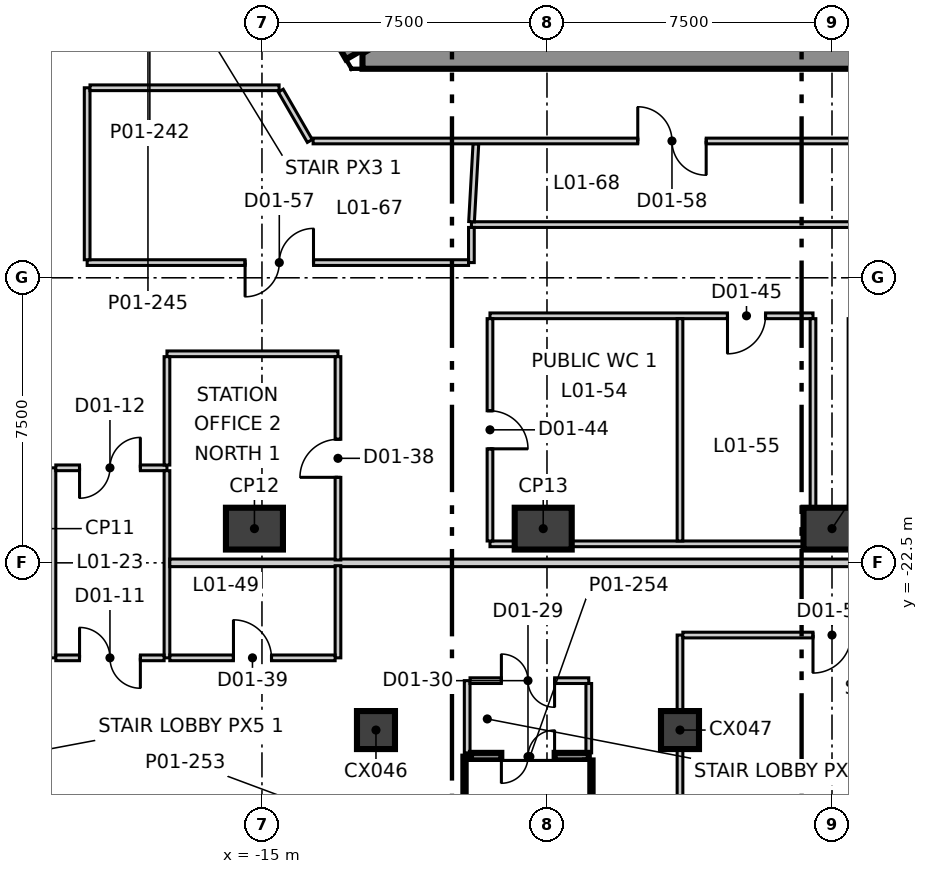
"""IFC4 building model, lengths in metres.
Left out: names, types, materials, properties, quantities, classifications, styles, units other than length and angle.
Written with IfcOpenShell. Run it as: python <this file> out.ifc"""

import sys

from ifc_helpers import new_model, si_unit, direction, frame, frame_2d, origin, origin_2d, place, context, subcontext, project, spatial, polyline, rectangle, outline, extrude, element, fill, save


model = new_model("IFC4")
c1 = context("Model", 3, precision=1e-05, world=origin(), true_north=direction((0.0, 1.0)))
c2 = subcontext(c1, "Body", "Model", "MODEL_VIEW")
j1 = project(units=[si_unit("LENGTHUNIT", "METRE"), si_unit("PLANEANGLEUNIT", "RADIAN")], contexts=[c1])
p1 = place(None, origin())
s1 = spatial("IfcSite", under=j1, at=p1, CompositionType="ELEMENT")
p2 = place(p1, origin())
s2 = spatial("IfcBuilding", under=s1, at=p2, CompositionType="ELEMENT")
p3 = place(p2, frame((0.0, 0.0, 8.5)))
s3 = spatial("IfcBuildingStorey", under=s2, at=p3, CompositionType="ELEMENT", Elevation=8.5)
p4 = place(p3, frame((-13.972, -6.2, -0.4), z_axis=(0.0, 0.0, 1.0), x_axis=(0.500077567175, -0.865980615723, 0.0)))
e1 = element("IfcWall", 1, at=p4, inside=s3, PredefinedType="SHEAR", context=c2, shape_type="SweptSolid", body=[
    extrude(outline(polyline([(-0.289, -0.5), (1.616, -0.5), (3.522, -0.5), (2.944, 0.499), (1.617, 0.5), (0.289, 0.5), (-0.289, -0.5)])), origin(), (0.0, 0.0, 1.0), 6.0),
])
p5 = place(p4, frame((0.917, 0.0, 0.4)))
e2 = element("IfcOpeningElement", 2, at=p5, cuts=e1, PredefinedType="OPENING", context=c2, shape_type="SweptSolid", body=[
    extrude(rectangle(XDim=1.4, YDim=2.1, at=frame_2d((0.7, 1.05))), frame((0.0, 0.51, 0.0), z_axis=(0.0, -1.0, 0.0), x_axis=(1.0, 0.0, 0.0)), (0.0, 0.0, 1.0), 1.02),
])
p6 = place(p3, frame((-12.355, -9.0, -0.4), z_axis=(0.0, 0.0, 1.0), x_axis=(1.0, 0.0, 0.0)))
e3 = element("IfcWall", 3, at=p6, inside=s3, PredefinedType="SHEAR", context=c2, shape_type="SweptSolid", body=[
    extrude(outline(polyline([(-0.289, -0.5), (1.656, -0.5), (3.601, -0.5), (5.547, -0.5), (7.492, -0.5), (9.437, -0.5), (11.382, -0.5), (13.328, -0.5), (15.273, -0.5), (17.218, -0.5), (19.163, -0.5), (21.109, -0.5), (23.054, -0.5), (24.999, -0.5), (24.422, 0.5), (22.566, 0.5), (20.709, 0.5), (18.853, 0.5), (16.996, 0.5), (15.14, 0.5), (13.283, 0.5), (11.427, 0.5), (9.57, 0.5), (7.714, 0.5), (5.857, 0.5), (4.001, 0.5), (2.145, 0.5), (0.288, 0.5), (-0.289, -0.5)])), origin(), (0.0, 0.0, 1.0), 6.0),
])
for number, where, z_axis, x_axis in (
    (4, (-15.198, -21.6, -0.4), (0.0, 0.0, 1.0), (1.0, 0.0, 0.0)),
    (5, (-7.599, -21.6, -0.4), (0.0, 0.0, 1.0), (1.0, 0.0, 0.0)),
    (6, (0.0, -21.6, -0.4), (0.0, 0.0, 1.0), (1.0, 0.0, 0.0)),
):
    element("IfcColumn", number, at=place(p3, frame(where, z_axis=z_axis, x_axis=x_axis)), inside=s3, PredefinedType="COLUMN", context=c2, shape_type="SweptSolid", body=[
        extrude(rectangle(XDim=1.5, YDim=1.1, at=origin_2d()), origin(), (0.0, 0.0, 1.0), 6.0),
    ])
for number, where, z_axis, x_axis in (
    (7, (-12.0, -26.9, -0.4), (0.0, 0.0, 1.0), (1.0, 0.0, 0.0)),
    (8, (-4.0, -26.9, -0.4), (0.0, 0.0, 1.0), (1.0, 0.0, 0.0)),
):
    element("IfcColumn", number, at=place(p3, frame(where, z_axis=z_axis, x_axis=x_axis)), inside=s3, PredefinedType="COLUMN", context=c2, shape_type="SweptSolid", body=[
        extrude(rectangle(XDim=1.0, YDim=1.0, at=origin_2d()), origin(), (0.0, 0.0, 1.0), 6.0),
    ])
p7 = place(p3, frame((-9.6, -27.5, 0.0), z_axis=(0.0, 0.0, 1.0), x_axis=(0.0, 1.0, 0.0)))
e9 = element("IfcWall", 9, at=p7, inside=s3, PredefinedType="PARTITIONING", context=c2, shape_type="SweptSolid", body=[
    extrude(rectangle(XDim=1.9, YDim=0.15, at=frame_2d((0.95, 0.0))), origin(), (0.0, 0.0, 1.0), 5.6),
])
p8 = place(p3, frame((-9.525, -25.6, 0.0), z_axis=(0.0, 0.0, 1.0), x_axis=(1.0, 0.0, 0.0)))
e10 = element("IfcWall", 10, at=p8, inside=s3, PredefinedType="PARTITIONING", context=c2, shape_type="SweptSolid", body=[
    extrude(rectangle(XDim=3.125, YDim=0.15, at=frame_2d((1.562, 0.0))), origin(), (0.0, 0.0, 1.0), 5.6),
])
p9 = place(p8, frame((0.825, 0.0, 0.0)))
e11 = element("IfcOpeningElement", 11, at=p9, cuts=e10, PredefinedType="OPENING", context=c2, shape_type="SweptSolid", body=[
    extrude(rectangle(XDim=1.4, YDim=2.1, at=frame_2d((0.7, 1.05))), frame((0.0, 0.085, 0.0), z_axis=(0.0, -1.0, 0.0), x_axis=(1.0, 0.0, 0.0)), (0.0, 0.0, 1.0), 0.17),
])
p10 = place(p3, frame((-6.4, -27.5, 0.0), z_axis=(0.0, 0.0, 1.0), x_axis=(0.0, 1.0, 0.0)))
e12 = element("IfcWall", 12, at=p10, inside=s3, PredefinedType="PARTITIONING", context=c2, shape_type="SweptSolid", body=[
    extrude(rectangle(XDim=1.825, YDim=0.15, at=frame_2d((0.913, 0.0))), origin(), (0.0, 0.0, 1.0), 5.6),
])
p11 = place(p3, frame((-20.5, -25.0, 0.0), z_axis=(0.0, 0.0, 1.0), x_axis=(0.0, 1.0, 0.0)))
e13 = element("IfcWall", 13, at=p11, inside=s3, PredefinedType="PARTITIONING", context=c2, shape_type="SweptSolid", body=[
    extrude(rectangle(XDim=5.0, YDim=0.15, at=frame_2d((2.5, 0.0))), origin(), (0.0, 0.0, 1.0), 5.6),
])
p12 = place(p3, frame((-20.425, -20.0, 0.0), z_axis=(0.0, 0.0, 1.0), x_axis=(1.0, 0.0, 0.0)))
e14 = element("IfcWall", 14, at=p12, inside=s3, PredefinedType="PARTITIONING", context=c2, shape_type="SweptSolid", body=[
    extrude(rectangle(XDim=2.925, YDim=0.15, at=frame_2d((1.462, 0.0))), origin(), (0.0, 0.0, 1.0), 5.6),
])
p13 = place(p12, frame((0.625, 0.0, 0.0)))
e15 = element("IfcOpeningElement", 15, at=p13, cuts=e14, PredefinedType="OPENING", context=c2, shape_type="SweptSolid", body=[
    extrude(rectangle(XDim=1.6, YDim=2.1, at=frame_2d((0.8, 1.05))), frame((0.0, 0.085, 0.0), z_axis=(0.0, -1.0, 0.0), x_axis=(1.0, 0.0, 0.0)), (0.0, 0.0, 1.0), 0.17),
])
p14 = place(p3, frame((-17.5, -25.0, 0.0), z_axis=(0.0, 0.0, 1.0), x_axis=(0.0, 1.0, 0.0)))
e16 = element("IfcWall", 16, at=p14, inside=s3, PredefinedType="PARTITIONING", context=c2, shape_type="SweptSolid", body=[
    extrude(rectangle(XDim=4.925, YDim=0.15, at=frame_2d((2.462, 0.0))), origin(), (0.0, 0.0, 1.0), 5.6),
])
p15 = place(p3, frame((-20.425, -25.0, 0.0), z_axis=(0.0, 0.0, 1.0), x_axis=(1.0, 0.0, 0.0)))
e17 = element("IfcWall", 17, at=p15, inside=s3, PredefinedType="PARTITIONING", context=c2, shape_type="SweptSolid", body=[
    extrude(rectangle(XDim=2.85, YDim=0.15, at=frame_2d((1.425, 0.0))), origin(), (0.0, 0.0, 1.0), 5.6),
])
p16 = place(p15, frame((0.625, 0.0, 0.0)))
e18 = element("IfcOpeningElement", 18, at=p16, cuts=e17, PredefinedType="OPENING", context=c2, shape_type="SweptSolid", body=[
    extrude(rectangle(XDim=1.6, YDim=2.1, at=frame_2d((0.8, 1.05))), frame((0.0, 0.085, 0.0), z_axis=(0.0, -1.0, 0.0), x_axis=(1.0, 0.0, 0.0)), (0.0, 0.0, 1.0), 0.17),
])
p17 = place(p3, frame((-17.425, -22.5, 0.0), z_axis=(0.0, 0.0, 1.0), x_axis=(1.0, 0.0, 0.0)))
e19 = element("IfcWall", 19, at=p17, inside=s3, PredefinedType="SOLIDWALL", context=c2, shape_type="SweptSolid", body=[
    extrude(rectangle(XDim=34.85, YDim=0.2, at=frame_2d((17.425, 0.0))), origin(), (0.0, 0.0, 1.0), 5.6),
])
p18 = place(p3, frame((-17.5, -17.0, 0.0), z_axis=(0.0, 0.0, 1.0), x_axis=(1.0, 0.0, 0.0)))
e20 = element("IfcWall", 20, at=p18, inside=s3, PredefinedType="PARTITIONING", context=c2, shape_type="SweptSolid", body=[
    extrude(rectangle(XDim=4.5, YDim=0.15, at=frame_2d((2.25, 0.0))), origin(), (0.0, 0.0, 1.0), 5.6),
])
p19 = place(p3, frame((-13.0, -25.0, 0.0), z_axis=(0.0, 0.0, 1.0), x_axis=(0.0, 1.0, 0.0)))
e21 = element("IfcWall", 21, at=p19, inside=s3, PredefinedType="PARTITIONING", context=c2, shape_type="SweptSolid", body=[
    extrude(rectangle(XDim=2.425, YDim=0.15, at=frame_2d((1.212, 0.0))), origin(), (0.0, 0.0, 1.0), 5.6),
])
p20 = place(p3, frame((-13.0, -22.425, 0.0), z_axis=(0.0, 0.0, 1.0), x_axis=(0.0, 1.0, 0.0)))
e22 = element("IfcWall", 22, at=p20, inside=s3, PredefinedType="PARTITIONING", context=c2, shape_type="SweptSolid", body=[
    extrude(rectangle(XDim=5.35, YDim=0.15, at=frame_2d((2.675, 0.0))), origin(), (0.0, 0.0, 1.0), 5.6),
])
p21 = place(p20, frame((2.175, 0.0, 0.0)))
e23 = element("IfcOpeningElement", 23, at=p21, cuts=e22, PredefinedType="OPENING", context=c2, shape_type="SweptSolid", body=[
    extrude(rectangle(XDim=1.0, YDim=2.1, at=frame_2d((0.5, 1.05))), frame((0.0, 0.085, 0.0), z_axis=(0.0, -1.0, 0.0), x_axis=(1.0, 0.0, 0.0)), (0.0, 0.0, 1.0), 0.17),
])
p22 = place(p3, frame((-17.425, -25.0, 0.0), z_axis=(0.0, 0.0, 1.0), x_axis=(1.0, 0.0, 0.0)))
e24 = element("IfcWall", 24, at=p22, inside=s3, PredefinedType="PARTITIONING", context=c2, shape_type="SweptSolid", body=[
    extrude(rectangle(XDim=4.35, YDim=0.15, at=frame_2d((2.175, 0.0))), origin(), (0.0, 0.0, 1.0), 5.6),
])
p23 = place(p22, frame((1.675, 0.0, 0.0)))
e25 = element("IfcOpeningElement", 25, at=p23, cuts=e24, PredefinedType="OPENING", context=c2, shape_type="SweptSolid", body=[
    extrude(rectangle(XDim=1.0, YDim=2.1, at=frame_2d((0.5, 1.05))), frame((0.0, 0.085, 0.0), z_axis=(0.0, -1.0, 0.0), x_axis=(1.0, 0.0, 0.0)), (0.0, 0.0, 1.0), 0.17),
])
p24 = place(p3, frame((-17.5, -19.927, 0.0), z_axis=(0.0, 0.0, 1.0), x_axis=(0.0, 1.0, 0.0)))
e26 = element("IfcWall", 26, at=p24, inside=s3, PredefinedType="PARTITIONING", context=c2, shape_type="SweptSolid", body=[
    extrude(rectangle(XDim=2.852, YDim=0.15, at=frame_2d((1.426, 0.0))), origin(), (0.0, 0.0, 1.0), 5.6),
])
p25 = place(p3, frame((-9.489, -13.6, 0.0), z_axis=(0.0, 0.0, 1.0), x_axis=(1.0, 0.0, 0.0)))
e27 = element("IfcWall", 27, at=p25, inside=s3, PredefinedType="PARTITIONING", context=c2, shape_type="SweptSolid", body=[
    extrude(rectangle(XDim=17.389, YDim=0.15, at=frame_2d((8.694, 0.0))), origin(), (0.0, 0.0, 1.0), 5.6),
])
p26 = place(p3, frame((-9.485, -13.525, 0.0), z_axis=(0.0, 0.0, 1.0), x_axis=(0.055535883175, 0.99845669194, 0.0)))
e28 = element("IfcWall", 28, at=p26, inside=s3, PredefinedType="PARTITIONING", context=c2, shape_type="SweptSolid", body=[
    extrude(rectangle(XDim=2.053, YDim=0.15, at=frame_2d((1.026, 0.0))), origin(), (0.0, 0.0, 1.0), 5.6),
])
p27 = place(p3, frame((-9.489, -14.6, 0.0), z_axis=(0.0, 0.0, 1.0), x_axis=(0.0, 1.0, 0.0)))
e29 = element("IfcWall", 29, at=p27, inside=s3, PredefinedType="PARTITIONING", context=c2, shape_type="SweptSolid", body=[
    extrude(rectangle(XDim=0.925, YDim=0.15, at=frame_2d((0.462, 0.0))), origin(), (0.0, 0.0, 1.0), 5.6),
])
p28 = place(p3, frame((-19.6, -14.6, 0.0), z_axis=(0.0, 0.0, 1.0), x_axis=(1.0, 0.0, 0.0)))
e30 = element("IfcWall", 30, at=p28, inside=s3, PredefinedType="PARTITIONING", context=c2, shape_type="SweptSolid", body=[
    extrude(rectangle(XDim=10.036, YDim=0.15, at=frame_2d((5.018, 0.0))), origin(), (0.0, 0.0, 1.0), 5.6),
])
p29 = place(p28, frame((4.156, 0.0, 0.0)))
e31 = element("IfcOpeningElement", 31, at=p29, cuts=e30, PredefinedType="OPENING", context=c2, shape_type="SweptSolid", body=[
    extrude(rectangle(XDim=1.8, YDim=2.1, at=frame_2d((0.9, 1.05))), frame((0.0, 0.085, 0.0), z_axis=(0.0, -1.0, 0.0), x_axis=(1.0, 0.0, 0.0)), (0.0, 0.0, 1.0), 0.17),
])
p30 = place(p3, frame((-19.6, -14.525, 0.0), z_axis=(0.0, 0.0, 1.0), x_axis=(0.0, 1.0, 0.0)))
e32 = element("IfcWall", 32, at=p30, inside=s3, PredefinedType="PARTITIONING", context=c2, shape_type="SweptSolid", body=[
    extrude(rectangle(XDim=4.525, YDim=0.15, at=frame_2d((2.262, 0.0))), origin(), (0.0, 0.0, 1.0), 5.6),
])
p31 = place(p3, frame((-19.525, -10.0, 0.0), z_axis=(0.0, 0.0, 1.0), x_axis=(1.0, 0.0, 0.0)))
e33 = element("IfcWall", 33, at=p31, inside=s3, PredefinedType="PARTITIONING", context=c2, shape_type="SweptSolid", body=[
    extrude(rectangle(XDim=4.976, YDim=0.15, at=frame_2d((2.488, 0.0))), origin(), (0.0, 0.0, 1.0), 5.6),
])
p32 = place(p3, frame((-14.506, -10.075, 0.0), z_axis=(0.0, 0.0, 1.0), x_axis=(0.500086174919, -0.865975644955, 0.0)))
e34 = element("IfcWall", 34, at=p32, inside=s3, PredefinedType="PARTITIONING", context=c2, shape_type="SweptSolid", body=[
    extrude(rectangle(XDim=1.53, YDim=0.15, at=frame_2d((0.765, 0.0))), origin(), (0.0, 0.0, 1.0), 5.6),
])
p33 = place(p3, frame((-13.654, -11.4, 0.0), z_axis=(0.0, 0.0, 1.0), x_axis=(1.0, 0.0, 0.0)))
e35 = element("IfcWall", 35, at=p33, inside=s3, PredefinedType="PARTITIONING", context=c2, shape_type="SweptSolid", body=[
    extrude(rectangle(XDim=24.254, YDim=0.15, at=frame_2d((12.127, 0.0))), origin(), (0.0, 0.0, 1.0), 5.6),
])
p34 = place(p33, frame((8.543, 0.0, 0.0)))
e36 = element("IfcOpeningElement", 36, at=p34, cuts=e35, PredefinedType="OPENING", context=c2, shape_type="SweptSolid", body=[
    extrude(rectangle(XDim=1.8, YDim=2.1, at=frame_2d((0.9, 1.05))), frame((0.0, 0.085, 0.0), z_axis=(0.0, -1.0, 0.0), x_axis=(1.0, 0.0, 0.0)), (0.0, 0.0, 1.0), 0.17),
])
p35 = place(p3, frame((-9.0, -16.0, 0.0), z_axis=(0.0, 0.0, 1.0), x_axis=(1.0, 0.0, 0.0)))
e37 = element("IfcWall", 37, at=p35, inside=s3, PredefinedType="PARTITIONING", context=c2, shape_type="SweptSolid", body=[
    extrude(rectangle(XDim=8.5, YDim=0.15, at=frame_2d((4.25, 0.0))), origin(), (0.0, 0.0, 1.0), 5.6),
])
p36 = place(p35, frame((6.25, 0.0, 0.0)))
e38 = element("IfcOpeningElement", 38, at=p36, cuts=e37, PredefinedType="OPENING", context=c2, shape_type="SweptSolid", body=[
    extrude(rectangle(XDim=1.0, YDim=2.1, at=frame_2d((0.5, 1.05))), frame((0.0, 0.085, 0.0), z_axis=(0.0, -1.0, 0.0), x_axis=(1.0, 0.0, 0.0)), (0.0, 0.0, 1.0), 0.17),
])
p37 = place(p3, frame((-0.5, -22.0, 0.0), z_axis=(0.0, 0.0, 1.0), x_axis=(0.0, 1.0, 0.0)))
e39 = element("IfcWall", 39, at=p37, inside=s3, PredefinedType="PARTITIONING", context=c2, shape_type="SweptSolid", body=[
    extrude(rectangle(XDim=5.925, YDim=0.15, at=frame_2d((2.962, 0.0))), origin(), (0.0, 0.0, 1.0), 5.1),
])
p38 = place(p3, frame((-9.0, -22.0, 0.0), z_axis=(0.0, 0.0, 1.0), x_axis=(1.0, 0.0, 0.0)))
e40 = element("IfcWall", 40, at=p38, inside=s3, PredefinedType="PARTITIONING", context=c2, shape_type="SweptSolid", body=[
    extrude(rectangle(XDim=8.425, YDim=0.15, at=frame_2d((4.212, 0.0))), origin(), (0.0, 0.0, 1.0), 5.6),
])
p39 = place(p3, frame((-4.0, -32.0, 0.0), z_axis=(0.0, 0.0, 1.0), x_axis=(0.0, 1.0, 0.0)))
e41 = element("IfcWall", 41, at=p39, inside=s3, PredefinedType="PARTITIONING", context=c2, shape_type="SweptSolid", body=[
    extrude(rectangle(XDim=7.6, YDim=0.15, at=frame_2d((3.8, 0.0))), origin(), (0.0, 0.0, 1.0), 5.6),
])
p40 = place(p3, frame((-4.0, -21.925, 0.0), z_axis=(0.0, 0.0, 1.0), x_axis=(0.0, 1.0, 0.0)))
e42 = element("IfcWall", 42, at=p40, inside=s3, PredefinedType="PARTITIONING", context=c2, shape_type="SweptSolid", body=[
    extrude(rectangle(XDim=5.85, YDim=0.15, at=frame_2d((2.925, 0.0))), origin(), (0.0, 0.0, 1.0), 5.6),
])
p41 = place(p3, frame((-9.0, -21.925, 0.0), z_axis=(0.0, 0.0, 1.0), x_axis=(0.0, 1.0, 0.0)))
e43 = element("IfcWall", 43, at=p41, inside=s3, PredefinedType="PARTITIONING", context=c2, shape_type="SweptSolid", body=[
    extrude(rectangle(XDim=5.85, YDim=0.15, at=frame_2d((2.925, 0.0))), origin(), (0.0, 0.0, 1.0), 5.6),
])
p42 = place(p41, frame((2.425, 0.0, 0.0)))
e44 = element("IfcOpeningElement", 44, at=p42, cuts=e43, PredefinedType="OPENING", context=c2, shape_type="SweptSolid", body=[
    extrude(rectangle(XDim=1.0, YDim=2.1, at=frame_2d((0.5, 1.05))), frame((0.0, 0.085, 0.0), z_axis=(0.0, -1.0, 0.0), x_axis=(1.0, 0.0, 0.0)), (0.0, 0.0, 1.0), 0.17),
])
p43 = place(p3, frame((-3.925, -24.4, 0.0), z_axis=(0.0, 0.0, 1.0), x_axis=(1.0, 0.0, 0.0)))
e45 = element("IfcWall", 45, at=p43, inside=s3, PredefinedType="PARTITIONING", context=c2, shape_type="SweptSolid", body=[
    extrude(rectangle(XDim=7.925, YDim=0.15, at=frame_2d((3.962, 0.0))), origin(), (0.0, 0.0, 1.0), 5.6),
])
p44 = place(p43, frame((3.425, 0.0, 0.0)))
e46 = element("IfcOpeningElement", 46, at=p44, cuts=e45, PredefinedType="OPENING", context=c2, shape_type="SweptSolid", body=[
    extrude(rectangle(XDim=1.0, YDim=2.1, at=frame_2d((0.5, 1.05))), frame((0.0, 0.085, 0.0), z_axis=(0.0, -1.0, 0.0), x_axis=(1.0, 0.0, 0.0)), (0.0, 0.0, 1.0), 0.17),
])
p45 = place(p3, frame((-9.6, -33.4, 0.0), z_axis=(0.0, 0.0, 1.0), x_axis=(0.0, 1.0, 0.0)))
e47 = element("IfcWall", 47, at=p45, inside=s3, PredefinedType="SOLIDWALL", context=c2, shape_type="SweptSolid", body=[
    extrude(rectangle(XDim=5.8, YDim=0.2, at=frame_2d((2.9, 0.0))), origin(), (0.0, 0.0, 1.0), 5.6),
])
p46 = place(p3, frame((-9.5, -27.6, 0.0), z_axis=(0.0, 0.0, 1.0), x_axis=(1.0, 0.0, 0.0)))
e48 = element("IfcWall", 48, at=p46, inside=s3, PredefinedType="SOLIDWALL", context=c2, shape_type="SweptSolid", body=[
    extrude(rectangle(XDim=3.1, YDim=0.2, at=frame_2d((1.55, 0.0))), origin(), (0.0, 0.0, 1.0), 5.6),
])
p47 = place(p46, frame((0.8, 0.0, 0.0)))
e49 = element("IfcOpeningElement", 49, at=p47, cuts=e48, PredefinedType="OPENING", context=c2, shape_type="SweptSolid", body=[
    extrude(rectangle(XDim=1.4, YDim=2.1, at=frame_2d((0.7, 1.05))), frame((0.0, 0.11, 0.0), z_axis=(0.0, -1.0, 0.0), x_axis=(1.0, 0.0, 0.0)), (0.0, 0.0, 1.0), 0.22),
])
p48 = place(p3, frame((-6.4, -33.4, 0.0), z_axis=(0.0, 0.0, 1.0), x_axis=(0.0, 1.0, 0.0)))
e50 = element("IfcWall", 50, at=p48, inside=s3, PredefinedType="SOLIDWALL", context=c2, shape_type="SweptSolid", body=[
    extrude(rectangle(XDim=5.7, YDim=0.2, at=frame_2d((2.85, 0.0))), origin(), (0.0, 0.0, 1.0), 5.6),
])
p49 = place(p16, origin())
e51 = element("IfcDoor", 51, at=p49, inside=s3, OperationType="DOUBLE_DOOR_SINGLE_SWING", PredefinedType="DOOR", context=c2, shape_type="SweptSolid", body=[
    extrude(rectangle(XDim=1.6, YDim=2.1, at=frame_2d((0.8, 1.05))), frame((0.0, 0.025, 0.0), z_axis=(0.0, -1.0, 0.0), x_axis=(1.0, 0.0, 0.0)), (0.0, 0.0, 1.0), 0.05),
])
fill(e18, e51)
p50 = place(p13, origin())
e52 = element("IfcDoor", 52, at=p50, inside=s3, OperationType="DOUBLE_DOOR_SINGLE_SWING", PredefinedType="DOOR", context=c2, shape_type="SweptSolid", body=[
    extrude(rectangle(XDim=1.6, YDim=2.1, at=frame_2d((0.8, 1.05))), frame((0.0, 0.025, 0.0), z_axis=(0.0, -1.0, 0.0), x_axis=(1.0, 0.0, 0.0)), (0.0, 0.0, 1.0), 0.05),
])
fill(e15, e52)
p51 = place(p47, origin())
e53 = element("IfcDoor", 53, at=p51, inside=s3, OperationType="DOUBLE_DOOR_SINGLE_SWING", PredefinedType="DOOR", context=c2, shape_type="SweptSolid", body=[
    extrude(rectangle(XDim=1.4, YDim=2.1, at=frame_2d((0.7, 1.05))), frame((0.0, 0.025, 0.0), z_axis=(0.0, -1.0, 0.0), x_axis=(1.0, 0.0, 0.0)), (0.0, 0.0, 1.0), 0.05),
])
fill(e49, e53)
p52 = place(p9, origin())
e54 = element("IfcDoor", 54, at=p52, inside=s3, OperationType="DOUBLE_DOOR_SINGLE_SWING", PredefinedType="DOOR", context=c2, shape_type="SweptSolid", body=[
    extrude(rectangle(XDim=1.4, YDim=2.1, at=frame_2d((0.7, 1.05))), frame((0.0, 0.025, 0.0), z_axis=(0.0, -1.0, 0.0), x_axis=(1.0, 0.0, 0.0)), (0.0, 0.0, 1.0), 0.05),
])
fill(e11, e54)
p53 = place(p21, origin())
e55 = element("IfcDoor", 55, at=p53, inside=s3, OperationType="SINGLE_SWING_RIGHT", PredefinedType="DOOR", context=c2, shape_type="SweptSolid", body=[
    extrude(rectangle(XDim=1.0, YDim=2.1, at=frame_2d((0.5, 1.05))), frame((0.0, 0.025, 0.0), z_axis=(0.0, -1.0, 0.0), x_axis=(1.0, 0.0, 0.0)), (0.0, 0.0, 1.0), 0.05),
])
fill(e23, e55)
p54 = place(p23, origin())
e56 = element("IfcDoor", 56, at=p54, inside=s3, OperationType="SINGLE_SWING_RIGHT", PredefinedType="DOOR", context=c2, shape_type="SweptSolid", body=[
    extrude(rectangle(XDim=1.0, YDim=2.1, at=frame_2d((0.5, 1.05))), frame((0.0, 0.025, 0.0), z_axis=(0.0, -1.0, 0.0), x_axis=(1.0, 0.0, 0.0)), (0.0, 0.0, 1.0), 0.05),
])
fill(e25, e56)
p55 = place(p42, origin())
e57 = element("IfcDoor", 57, at=p55, inside=s3, OperationType="SINGLE_SWING_LEFT", PredefinedType="DOOR", context=c2, shape_type="SweptSolid", body=[
    extrude(rectangle(XDim=1.0, YDim=2.1, at=frame_2d((0.5, 1.05))), frame((0.0, 0.025, 0.0), z_axis=(0.0, -1.0, 0.0), x_axis=(1.0, 0.0, 0.0)), (0.0, 0.0, 1.0), 0.05),
])
fill(e44, e57)
p56 = place(p36, origin())
e58 = element("IfcDoor", 58, at=p56, inside=s3, OperationType="SINGLE_SWING_LEFT", PredefinedType="DOOR", context=c2, shape_type="SweptSolid", body=[
    extrude(rectangle(XDim=1.0, YDim=2.1, at=frame_2d((0.5, 1.05))), frame((0.0, 0.025, 0.0), z_axis=(0.0, -1.0, 0.0), x_axis=(1.0, 0.0, 0.0)), (0.0, 0.0, 1.0), 0.05),
])
fill(e38, e58)
p57 = place(p44, origin())
e59 = element("IfcDoor", 59, at=p57, inside=s3, OperationType="SINGLE_SWING_LEFT", PredefinedType="DOOR", context=c2, shape_type="SweptSolid", body=[
    extrude(rectangle(XDim=1.0, YDim=2.1, at=frame_2d((0.5, 1.05))), frame((0.0, 0.025, 0.0), z_axis=(0.0, -1.0, 0.0), x_axis=(1.0, 0.0, 0.0)), (0.0, 0.0, 1.0), 0.05),
])
fill(e46, e59)
p58 = place(p29, origin())
e60 = element("IfcDoor", 60, at=p58, inside=s3, OperationType="DOUBLE_DOOR_SINGLE_SWING", PredefinedType="DOOR", context=c2, shape_type="SweptSolid", body=[
    extrude(rectangle(XDim=1.8, YDim=2.1, at=frame_2d((0.9, 1.05))), frame((0.0, 0.025, 0.0), z_axis=(0.0, -1.0, 0.0), x_axis=(1.0, 0.0, 0.0)), (0.0, 0.0, 1.0), 0.05),
])
fill(e31, e60)
p59 = place(p34, origin())
e61 = element("IfcDoor", 61, at=p59, inside=s3, OperationType="DOUBLE_DOOR_SINGLE_SWING", PredefinedType="DOOR", context=c2, shape_type="SweptSolid", body=[
    extrude(rectangle(XDim=1.8, YDim=2.1, at=frame_2d((0.9, 1.05))), frame((0.0, 0.025, 0.0), z_axis=(0.0, -1.0, 0.0), x_axis=(1.0, 0.0, 0.0)), (0.0, 0.0, 1.0), 0.05),
])
fill(e36, e61)
save(model, sys.argv[1])
